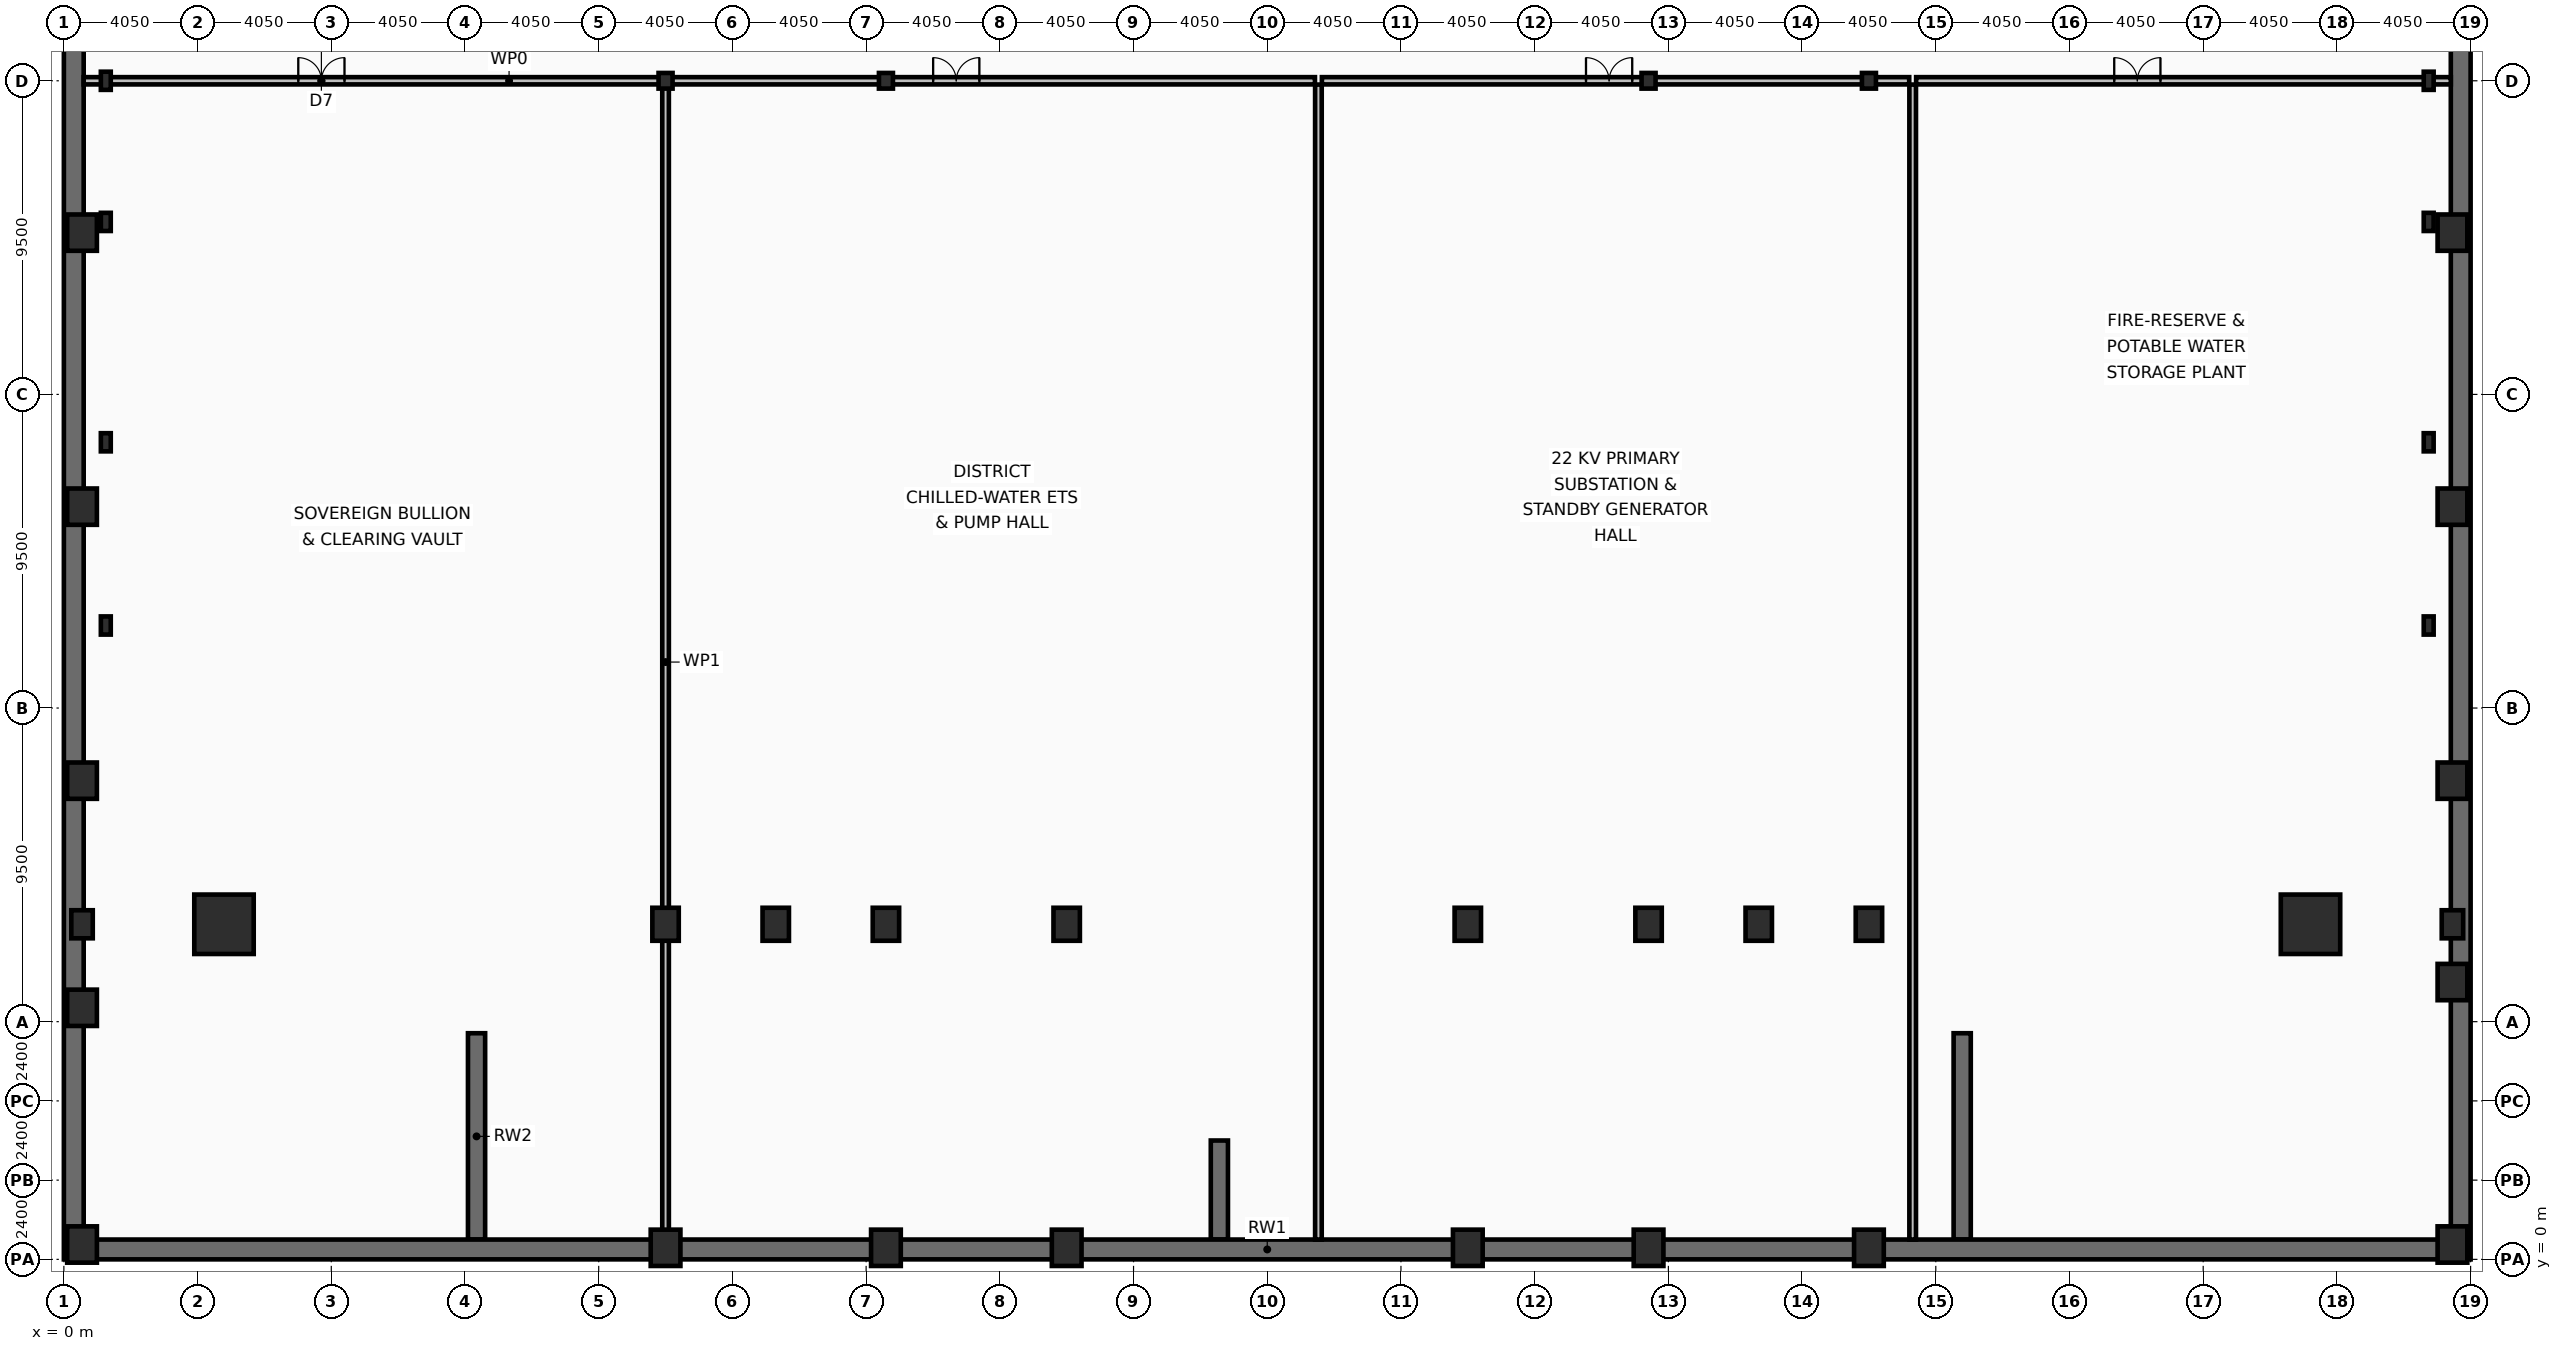
"""IFC4 building model, lengths in metres.
Left out: names, types, materials, properties, quantities, classifications, styles, units other than length and angle.
Written with IfcOpenShell. Run it as: python <this file> out.ifc"""

import sys

from ifc_helpers import new_model, si_unit, direction, frame, frame_2d, origin, origin_2d, place, context, subcontext, project, spatial, rectangle, hollow_rectangle, i_section, extrude, element, fill, save


model = new_model("IFC4")
c1 = context("Model", 3, precision=1e-05, world=origin(), true_north=direction((0.0, 1.0)))
c2 = subcontext(c1, "Body", "Model", "MODEL_VIEW")
j1 = project(units=[si_unit("LENGTHUNIT", "METRE"), si_unit("PLANEANGLEUNIT", "RADIAN")], contexts=[c1])
p1 = place(None, origin())
s1 = spatial("IfcSite", under=j1, at=p1, CompositionType="ELEMENT")
p2 = place(p1, origin())
s2 = spatial("IfcBuilding", under=s1, at=p2, CompositionType="ELEMENT")
p3 = place(p2, frame((0.0, 0.0, -9.0)))
s3 = spatial("IfcBuildingStorey", under=s2, at=p3, CompositionType="ELEMENT", Elevation=-9.0)
p4 = place(p3, frame((12.5, 0.6, -0.2), z_axis=(0.0, 0.0, 1.0), x_axis=(0.0, 1.0, 0.0)))
e1 = element("IfcWall", 1, at=p4, inside=s3, PredefinedType="SOLIDWALL", context=c2, shape_type="SweptSolid", body=[
    extrude(rectangle(XDim=6.25, YDim=0.52, at=frame_2d((3.125, 0.0))), origin(), (0.0, 0.0, 1.0), 4.395),
])
p5 = place(p3, frame((35.0, 0.6, -0.2), z_axis=(0.0, 0.0, 1.0), x_axis=(0.0, 1.0, 0.0)))
e2 = element("IfcWall", 2, at=p5, inside=s3, PredefinedType="SOLIDWALL", context=c2, shape_type="SweptSolid", body=[
    extrude(rectangle(XDim=3.0, YDim=0.52, at=frame_2d((1.5, 0.0))), origin(), (0.0, 0.0, 1.0), 4.7),
])
p6 = place(p3, frame((57.5, 0.6, -0.2), z_axis=(0.0, 0.0, 1.0), x_axis=(0.0, 1.0, 0.0)))
e3 = element("IfcWall", 3, at=p6, inside=s3, PredefinedType="SOLIDWALL", context=c2, shape_type="SweptSolid", body=[
    extrude(rectangle(XDim=6.25, YDim=0.52, at=frame_2d((3.125, 0.0))), origin(), (0.0, 0.0, 1.0), 4.7),
])
p7 = place(p3, frame((72.3, 0.3, -0.2), z_axis=(0.0, 0.0, 1.0), x_axis=(-1.0, 0.0, 0.0)))
e4 = element("IfcWall", 4, at=p7, inside=s3, PredefinedType="SOLIDWALL", context=c2, shape_type="SweptSolid", body=[
    extrude(rectangle(XDim=71.7, YDim=0.6, at=frame_2d((35.85, 0.0))), origin(), (0.0, 0.0, 1.0), 4.48),
])
for number, where, z_axis, x_axis in (
    (5, (0.3, 0.0, -0.2), (0.0, 0.0, 1.0), (0.0, 1.0, 0.0)),
    (6, (72.6, 53.7, -0.2), (0.0, 0.0, 1.0), (0.0, -1.0, 0.0)),
):
    element("IfcWall", number, at=place(p3, frame(where, z_axis=z_axis, x_axis=x_axis)), inside=s3, PredefinedType="SOLIDWALL", context=c2, shape_type="SweptSolid", body=[
        extrude(rectangle(XDim=53.7, YDim=0.6, at=frame_2d((26.85, 0.0))), origin(), (0.0, 0.0, 1.0), 4.48),
    ])
for number, where, z_axis, x_axis in (
    (7, (4.85, 10.15, -0.2), (0.0, 0.0, 1.0), (1.0, 0.0, 0.0)),
    (8, (68.05, 10.15, -0.2), (0.0, 0.0, 1.0), (1.0, 0.0, 0.0)),
):
    element("IfcColumn", number, at=place(p3, frame(where, z_axis=z_axis, x_axis=x_axis)), inside=s3, PredefinedType="COLUMN", context=c2, shape_type="SweptSolid", body=[
        extrude(hollow_rectangle(XDim=1.8, YDim=1.8, WallThickness=0.08, at=origin_2d()), origin(), (0.0, 0.0, 1.0), 4.7),
    ])
for number, where, z_axis, x_axis in (
    (9, (18.225, 10.15, -0.2), (0.0, 0.0, 1.0), (1.0, 0.0, 0.0)),
    (10, (21.562, 10.15, -0.2), (0.0, 0.0, 1.0), (1.0, 0.0, 0.0)),
    (11, (24.9, 10.15, -0.2), (0.0, 0.0, 1.0), (1.0, 0.0, 0.0)),
    (12, (30.375, 10.15, -0.2), (0.0, 0.0, 1.0), (1.0, 0.0, 0.0)),
    (13, (42.525, 10.15, -0.2), (0.0, 0.0, 1.0), (1.0, 0.0, 0.0)),
    (14, (48.0, 10.15, -0.2), (0.0, 0.0, 1.0), (1.0, 0.0, 0.0)),
    (15, (51.337, 10.15, -0.2), (0.0, 0.0, 1.0), (1.0, 0.0, 0.0)),
    (16, (54.675, 10.15, -0.2), (0.0, 0.0, 1.0), (1.0, 0.0, 0.0)),
):
    element("IfcColumn", number, at=place(p3, frame(where, z_axis=z_axis, x_axis=x_axis)), inside=s3, PredefinedType="COLUMN", context=c2, shape_type="SweptSolid", body=[
        extrude(hollow_rectangle(XDim=0.8, YDim=1.0, WallThickness=0.055, at=origin_2d()), origin(), (0.0, 0.0, 1.0), 4.7),
    ])
for number, where, z_axis, x_axis in (
    (17, (1.27, 19.2, -0.2), (0.0, 0.0, 1.0), (1.0, 0.0, 0.0)),
    (18, (1.27, 24.75, -0.2), (0.0, 0.0, 1.0), (1.0, 0.0, 0.0)),
    (19, (1.27, 31.425, -0.2), (0.0, 0.0, 1.0), (1.0, 0.0, 0.0)),
    (20, (1.27, 35.7, -0.2), (0.0, 0.0, 1.0), (1.0, 0.0, 0.0)),
    (21, (71.63, 19.2, -0.2), (0.0, 0.0, 1.0), (1.0, 0.0, 0.0)),
    (22, (71.63, 24.75, -0.2), (0.0, 0.0, 1.0), (1.0, 0.0, 0.0)),
    (23, (71.63, 31.425, -0.2), (0.0, 0.0, 1.0), (1.0, 0.0, 0.0)),
    (24, (71.63, 35.7, -0.2), (0.0, 0.0, 1.0), (1.0, 0.0, 0.0)),
):
    element("IfcColumn", number, at=place(p3, frame(where, z_axis=z_axis, x_axis=x_axis)), inside=s3, PredefinedType="COLUMN", context=c2, shape_type="SweptSolid", body=[
        extrude(i_section(OverallWidth=0.3, OverallDepth=0.55, WebThickness=0.015, FlangeThickness=0.029, at=origin_2d()), origin(), (0.0, 0.0, 1.0), 4.7),
    ])
for number, where, z_axis, x_axis in (
    (25, (18.225, 35.7, -0.2), (0.0, 0.0, 1.0), (1.0, 0.0, 0.0)),
    (26, (24.9, 35.7, -0.2), (0.0, 0.0, 1.0), (1.0, 0.0, 0.0)),
    (27, (48.0, 35.7, -0.2), (0.0, 0.0, 1.0), (1.0, 0.0, 0.0)),
    (28, (54.675, 35.7, -0.2), (0.0, 0.0, 1.0), (1.0, 0.0, 0.0)),
):
    element("IfcColumn", number, at=place(p3, frame(where, z_axis=z_axis, x_axis=x_axis)), inside=s3, PredefinedType="COLUMN", context=c2, shape_type="SweptSolid", body=[
        extrude(i_section(OverallWidth=0.424, OverallDepth=0.474, WebThickness=0.048, FlangeThickness=0.077, at=origin_2d()), origin(), (0.0, 0.0, 1.0), 4.7),
    ])
for number, where, z_axis, x_axis in (
    (29, (0.55, 7.62, -0.2), (0.0, 0.0, 1.0), (1.0, 0.0, 0.0)),
    (30, (72.35, 8.4, -0.2), (0.0, 0.0, 1.0), (1.0, 0.0, 0.0)),
):
    element("IfcColumn", number, at=place(p3, frame(where, z_axis=z_axis, x_axis=x_axis)), inside=s3, PredefinedType="PILASTER", context=c2, shape_type="SweptSolid", body=[
        extrude(rectangle(XDim=0.9, YDim=1.1, at=origin_2d()), origin(), (0.0, 0.0, 1.0), 4.7),
    ])
for number, where, z_axis, x_axis in (
    (31, (0.55, 10.15, -0.2), (0.0, 0.0, 1.0), (1.0, 0.0, 0.0)),
    (32, (72.35, 10.15, -0.2), (0.0, 0.0, 1.0), (1.0, 0.0, 0.0)),
):
    element("IfcColumn", number, at=place(p3, frame(where, z_axis=z_axis, x_axis=x_axis)), inside=s3, PredefinedType="PILASTER", context=c2, shape_type="SweptSolid", body=[
        extrude(rectangle(XDim=0.65, YDim=0.85, at=origin_2d()), origin(), (0.0, 0.0, 1.0), 4.7),
    ])
for number, where, z_axis, x_axis in (
    (33, (0.55, 14.5, -0.2), (0.0, 0.0, 1.0), (1.0, 0.0, 0.0)),
    (34, (0.55, 22.8, -0.2), (0.0, 0.0, 1.0), (1.0, 0.0, 0.0)),
    (35, (0.55, 31.1, -0.2), (0.0, 0.0, 1.0), (1.0, 0.0, 0.0)),
    (36, (72.35, 14.5, -0.2), (0.0, 0.0, 1.0), (1.0, 0.0, 0.0)),
    (37, (72.35, 22.8, -0.2), (0.0, 0.0, 1.0), (1.0, 0.0, 0.0)),
    (38, (72.35, 31.1, -0.2), (0.0, 0.0, 1.0), (1.0, 0.0, 0.0)),
    (39, (0.55, 0.45, -0.2), (0.0, 0.0, 1.0), (1.0, 0.0, 0.0)),
    (40, (72.35, 0.45, -0.2), (0.0, 0.0, 1.0), (1.0, 0.0, 0.0)),
    (41, (18.225, 0.35, -0.2), (0.0, 0.0, 1.0), (1.0, 0.0, 0.0)),
    (42, (24.9, 0.35, -0.2), (0.0, 0.0, 1.0), (1.0, 0.0, 0.0)),
    (43, (30.375, 0.35, -0.2), (0.0, 0.0, 1.0), (1.0, 0.0, 0.0)),
    (44, (42.525, 0.35, -0.2), (0.0, 0.0, 1.0), (1.0, 0.0, 0.0)),
    (45, (48.0, 0.35, -0.2), (0.0, 0.0, 1.0), (1.0, 0.0, 0.0)),
    (46, (54.675, 0.35, -0.2), (0.0, 0.0, 1.0), (1.0, 0.0, 0.0)),
):
    element("IfcColumn", number, at=place(p3, frame(where, z_axis=z_axis, x_axis=x_axis)), inside=s3, PredefinedType="PILASTER", context=c2, shape_type="SweptSolid", body=[
        extrude(rectangle(XDim=0.9, YDim=1.1, at=origin_2d()), origin(), (0.0, 0.0, 1.0), 4.7),
    ])
p8 = place(p3, frame((0.6, 35.7, 0.0), z_axis=(0.0, 0.0, 1.0), x_axis=(1.0, 0.0, 0.0)))
e47 = element("IfcWall", 47, at=p8, inside=s3, PredefinedType="PARTITIONING", context=c2, shape_type="SweptSolid", body=[
    extrude(rectangle(XDim=17.52, YDim=0.22, at=frame_2d((8.76, 0.0))), origin(), (0.0, 0.0, 1.0), 3.37),
])
p9 = place(p8, frame((6.5, 0.0, 0.0)))
e48 = element("IfcOpeningElement", 48, at=p9, cuts=e47, PredefinedType="OPENING", context=c2, shape_type="SweptSolid", body=[
    extrude(rectangle(XDim=1.4, YDim=2.15, at=frame_2d((0.7, 1.075))), frame((0.0, 0.12, 0.0), z_axis=(0.0, -1.0, 0.0), x_axis=(1.0, 0.0, 0.0)), (0.0, 0.0, 1.0), 0.24),
])
p10 = place(p3, frame((18.33, 35.7, 0.0), z_axis=(0.0, 0.0, 1.0), x_axis=(1.0, 0.0, 0.0)))
e49 = element("IfcWall", 49, at=p10, inside=s3, PredefinedType="PARTITIONING", context=c2, shape_type="SweptSolid", body=[
    extrude(rectangle(XDim=19.565, YDim=0.22, at=frame_2d((9.782, 0.0))), origin(), (0.0, 0.0, 1.0), 3.37),
])
p11 = place(p10, frame((8.0, 0.0, 0.0)))
e50 = element("IfcOpeningElement", 50, at=p11, cuts=e49, PredefinedType="OPENING", context=c2, shape_type="SweptSolid", body=[
    extrude(rectangle(XDim=1.4, YDim=2.15, at=frame_2d((0.7, 1.075))), frame((0.0, 0.12, 0.0), z_axis=(0.0, -1.0, 0.0), x_axis=(1.0, 0.0, 0.0)), (0.0, 0.0, 1.0), 0.24),
])
p12 = place(p3, frame((38.105, 35.7, 0.0), z_axis=(0.0, 0.0, 1.0), x_axis=(1.0, 0.0, 0.0)))
e51 = element("IfcWall", 51, at=p12, inside=s3, PredefinedType="PARTITIONING", context=c2, shape_type="SweptSolid", body=[
    extrude(rectangle(XDim=17.79, YDim=0.22, at=frame_2d((8.895, 0.0))), origin(), (0.0, 0.0, 1.0), 3.37),
])
p13 = place(p12, frame((8.0, 0.0, 0.0)))
e52 = element("IfcOpeningElement", 52, at=p13, cuts=e51, PredefinedType="OPENING", context=c2, shape_type="SweptSolid", body=[
    extrude(rectangle(XDim=1.4, YDim=2.15, at=frame_2d((0.7, 1.075))), frame((0.0, 0.12, 0.0), z_axis=(0.0, -1.0, 0.0), x_axis=(1.0, 0.0, 0.0)), (0.0, 0.0, 1.0), 0.24),
])
p14 = place(p3, frame((56.105, 35.7, 0.0), z_axis=(0.0, 0.0, 1.0), x_axis=(1.0, 0.0, 0.0)))
e53 = element("IfcWall", 53, at=p14, inside=s3, PredefinedType="PARTITIONING", context=c2, shape_type="SweptSolid", body=[
    extrude(rectangle(XDim=16.195, YDim=0.22, at=frame_2d((8.098, 0.0))), origin(), (0.0, 0.0, 1.0), 3.62),
])
p15 = place(p14, frame((6.0, 0.0, 0.0)))
e54 = element("IfcOpeningElement", 54, at=p15, cuts=e53, PredefinedType="OPENING", context=c2, shape_type="SweptSolid", body=[
    extrude(rectangle(XDim=1.4, YDim=2.15, at=frame_2d((0.7, 1.075))), frame((0.0, 0.12, 0.0), z_axis=(0.0, -1.0, 0.0), x_axis=(1.0, 0.0, 0.0)), (0.0, 0.0, 1.0), 0.24),
])
p16 = place(p3, frame((18.225, 0.6, 0.0), z_axis=(0.0, 0.0, 1.0), x_axis=(0.0, 1.0, 0.0)))
e55 = element("IfcWall", 55, at=p16, inside=s3, PredefinedType="PARTITIONING", context=c2, shape_type="SweptSolid", body=[
    extrude(rectangle(XDim=34.985, YDim=0.2, at=frame_2d((17.492, 0.0))), origin(), (0.0, 0.0, 1.0), 3.37),
])
p17 = place(p3, frame((38.0, 0.6, 0.0), z_axis=(0.0, 0.0, 1.0), x_axis=(0.0, 1.0, 0.0)))
e56 = element("IfcWall", 56, at=p17, inside=s3, PredefinedType="PARTITIONING", context=c2, shape_type="SweptSolid", body=[
    extrude(rectangle(XDim=34.985, YDim=0.2, at=frame_2d((17.492, 0.0))), origin(), (0.0, 0.0, 1.0), 3.62),
])
p18 = place(p3, frame((56.0, 0.6, 0.0), z_axis=(0.0, 0.0, 1.0), x_axis=(0.0, 1.0, 0.0)))
e57 = element("IfcWall", 57, at=p18, inside=s3, PredefinedType="PARTITIONING", context=c2, shape_type="SweptSolid", body=[
    extrude(rectangle(XDim=34.985, YDim=0.2, at=frame_2d((17.492, 0.0))), origin(), (0.0, 0.0, 1.0), 3.37),
])
p19 = place(p9, origin())
e58 = element("IfcDoor", 58, at=p19, inside=s3, OperationType="DOUBLE_DOOR_SINGLE_SWING", PredefinedType="DOOR", context=c2, shape_type="SweptSolid", body=[
    extrude(rectangle(XDim=1.4, YDim=2.15, at=frame_2d((0.7, 1.075))), frame((0.0, 0.025, 0.0), z_axis=(0.0, -1.0, 0.0), x_axis=(1.0, 0.0, 0.0)), (0.0, 0.0, 1.0), 0.05),
])
fill(e48, e58)
p20 = place(p11, origin())
e59 = element("IfcDoor", 59, at=p20, inside=s3, OperationType="DOUBLE_DOOR_SINGLE_SWING", PredefinedType="DOOR", context=c2, shape_type="SweptSolid", body=[
    extrude(rectangle(XDim=1.4, YDim=2.15, at=frame_2d((0.7, 1.075))), frame((0.0, 0.025, 0.0), z_axis=(0.0, -1.0, 0.0), x_axis=(1.0, 0.0, 0.0)), (0.0, 0.0, 1.0), 0.05),
])
fill(e50, e59)
p21 = place(p13, origin())
e60 = element("IfcDoor", 60, at=p21, inside=s3, OperationType="DOUBLE_DOOR_SINGLE_SWING", PredefinedType="DOOR", context=c2, shape_type="SweptSolid", body=[
    extrude(rectangle(XDim=1.4, YDim=2.15, at=frame_2d((0.7, 1.075))), frame((0.0, 0.025, 0.0), z_axis=(0.0, -1.0, 0.0), x_axis=(1.0, 0.0, 0.0)), (0.0, 0.0, 1.0), 0.05),
])
fill(e52, e60)
p22 = place(p15, origin())
e61 = element("IfcDoor", 61, at=p22, inside=s3, OperationType="DOUBLE_DOOR_SINGLE_SWING", PredefinedType="DOOR", context=c2, shape_type="SweptSolid", body=[
    extrude(rectangle(XDim=1.4, YDim=2.15, at=frame_2d((0.7, 1.075))), frame((0.0, 0.025, 0.0), z_axis=(0.0, -1.0, 0.0), x_axis=(1.0, 0.0, 0.0)), (0.0, 0.0, 1.0), 0.05),
])
fill(e54, e61)
save(model, sys.argv[1])
